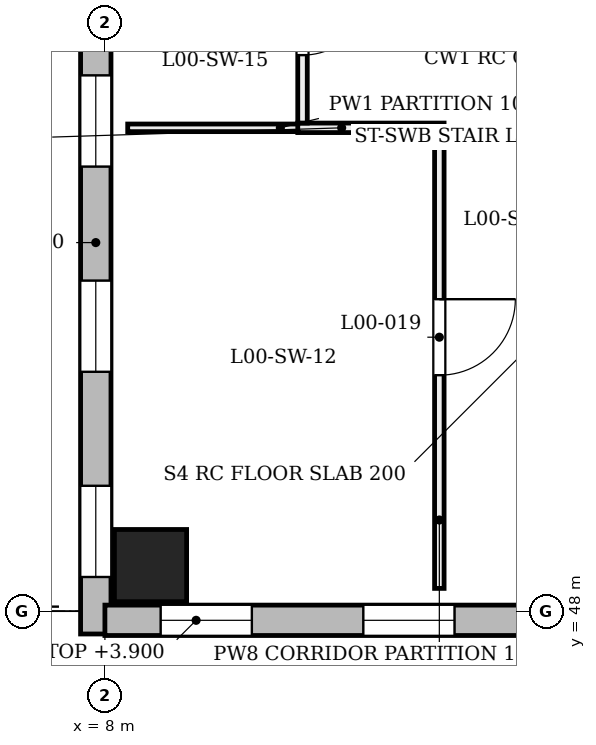
"""IFC4 building model, lengths in metres.
Left out: names, types, materials, properties, quantities, classifications, styles, units other than length and angle.
Written with IfcOpenShell. Run it as: python <this file> out.ifc"""

import sys

from ifc_helpers import new_model, si_unit, direction, frame, frame_2d, origin, origin_2d, place, context, subcontext, project, spatial, rectangle, extrude, element, fill, save


model = new_model("IFC4")
c1 = context("Model", 3, precision=1e-05, world=origin(), true_north=direction((0.0, 1.0)))
c2 = subcontext(c1, "Body", "Model", "MODEL_VIEW")
j1 = project(units=[si_unit("LENGTHUNIT", "METRE"), si_unit("PLANEANGLEUNIT", "RADIAN")], contexts=[c1])
p1 = place(None, origin())
s1 = spatial("IfcSite", under=j1, at=p1, CompositionType="ELEMENT")
p2 = place(p1, origin())
s2 = spatial("IfcBuilding", under=s1, at=p2, CompositionType="ELEMENT")
p3 = place(p2, origin())
s3 = spatial("IfcBuildingStorey", under=s2, at=p3, CompositionType="ELEMENT", Elevation=0.0)
p4 = place(p3, frame((8.6, 48.6, 0.0), z_axis=(0.0, 0.0, 1.0), x_axis=(1.0, 0.0, 0.0)))
e1 = element("IfcColumn", 1, at=p4, inside=s3, PredefinedType="COLUMN", context=c2, shape_type="SweptSolid", body=[
    extrude(rectangle(XDim=0.95, YDim=0.95, at=origin_2d()), origin(), (0.0, 0.0, 1.0), 4.8),
])
p5 = place(p3, frame((7.88, 47.7, 0.0), z_axis=(0.0, 0.0, 1.0), x_axis=(0.0, 1.0, 0.0)))
e2 = element("IfcWall", 2, at=p5, inside=s3, PredefinedType="SOLIDWALL", context=c2, shape_type="SweptSolid", body=[
    extrude(rectangle(XDim=16.575, YDim=0.4, at=frame_2d((8.288, 0.0))), origin(), (0.0, 0.0, 1.0), 3.9),
])
p6 = place(p5, frame((0.75, 0.0, 1.9)))
e3 = element("IfcOpeningElement", 3, at=p6, cuts=e2, PredefinedType="OPENING", context=c2, shape_type="SweptSolid", body=[
    extrude(rectangle(XDim=1.2, YDim=1.5, at=frame_2d((0.6, 0.75))), frame((0.0, 0.21, 0.0), z_axis=(0.0, -1.0, 0.0), x_axis=(1.0, 0.0, 0.0)), (0.0, 0.0, 1.0), 0.42),
])
p7 = place(p5, frame((3.45, 0.0, 1.9)))
e4 = element("IfcOpeningElement", 4, at=p7, cuts=e2, PredefinedType="OPENING", context=c2, shape_type="SweptSolid", body=[
    extrude(rectangle(XDim=1.2, YDim=1.5, at=frame_2d((0.6, 0.75))), frame((0.0, 0.21, 0.0), z_axis=(0.0, -1.0, 0.0), x_axis=(1.0, 0.0, 0.0)), (0.0, 0.0, 1.0), 0.42),
])
p8 = place(p5, frame((6.15, 0.0, 1.9)))
e5 = element("IfcOpeningElement", 5, at=p8, cuts=e2, PredefinedType="OPENING", context=c2, shape_type="SweptSolid", body=[
    extrude(rectangle(XDim=1.2, YDim=1.5, at=frame_2d((0.6, 0.75))), frame((0.0, 0.21, 0.0), z_axis=(0.0, -1.0, 0.0), x_axis=(1.0, 0.0, 0.0)), (0.0, 0.0, 1.0), 0.42),
])
p9 = place(p5, frame((8.85, 0.0, 1.9)))
e6 = element("IfcOpeningElement", 6, at=p9, cuts=e2, PredefinedType="OPENING", context=c2, shape_type="SweptSolid", body=[
    extrude(rectangle(XDim=1.2, YDim=1.5, at=frame_2d((0.6, 0.75))), frame((0.0, 0.21, 0.0), z_axis=(0.0, -1.0, 0.0), x_axis=(1.0, 0.0, 0.0)), (0.0, 0.0, 1.0), 0.42),
])
p10 = place(p5, frame((11.55, 0.0, 1.9)))
e7 = element("IfcOpeningElement", 7, at=p10, cuts=e2, PredefinedType="OPENING", context=c2, shape_type="SweptSolid", body=[
    extrude(rectangle(XDim=1.2, YDim=1.5, at=frame_2d((0.6, 0.75))), frame((0.0, 0.21, 0.0), z_axis=(0.0, -1.0, 0.0), x_axis=(1.0, 0.0, 0.0)), (0.0, 0.0, 1.0), 0.42),
])
p11 = place(p5, frame((14.25, 0.0, 1.9)))
e8 = element("IfcOpeningElement", 8, at=p11, cuts=e2, PredefinedType="OPENING", context=c2, shape_type="SweptSolid", body=[
    extrude(rectangle(XDim=1.2, YDim=1.5, at=frame_2d((0.6, 0.75))), frame((0.0, 0.21, 0.0), z_axis=(0.0, -1.0, 0.0), x_axis=(1.0, 0.0, 0.0)), (0.0, 0.0, 1.0), 0.42),
])
p12 = place(p3, frame((8.0, 47.88, 0.0), z_axis=(0.0, 0.0, 1.0), x_axis=(1.0, 0.0, 0.0)))
e9 = element("IfcWall", 9, at=p12, inside=s3, PredefinedType="SOLIDWALL", context=c2, shape_type="SweptSolid", body=[
    extrude(rectangle(XDim=8.0, YDim=0.4, at=frame_2d((4.0, 0.0))), origin(), (0.0, 0.0, 1.0), 3.9),
])
p13 = place(p12, frame((0.733, 0.0, 1.9)))
e10 = element("IfcOpeningElement", 10, at=p13, cuts=e9, PredefinedType="OPENING", context=c2, shape_type="SweptSolid", body=[
    extrude(rectangle(XDim=1.2, YDim=1.5, at=frame_2d((0.6, 0.75))), frame((0.0, 0.21, 0.0), z_axis=(0.0, -1.0, 0.0), x_axis=(1.0, 0.0, 0.0)), (0.0, 0.0, 1.0), 0.42),
])
p14 = place(p12, frame((3.4, 0.0, 1.9)))
e11 = element("IfcOpeningElement", 11, at=p14, cuts=e9, PredefinedType="OPENING", context=c2, shape_type="SweptSolid", body=[
    extrude(rectangle(XDim=1.2, YDim=1.5, at=frame_2d((0.6, 0.75))), frame((0.0, 0.21, 0.0), z_axis=(0.0, -1.0, 0.0), x_axis=(1.0, 0.0, 0.0)), (0.0, 0.0, 1.0), 0.42),
])
p15 = place(p12, frame((6.067, 0.0, 1.9)))
e12 = element("IfcOpeningElement", 12, at=p15, cuts=e9, PredefinedType="OPENING", context=c2, shape_type="SweptSolid", body=[
    extrude(rectangle(XDim=1.2, YDim=1.5, at=frame_2d((0.6, 0.75))), frame((0.0, 0.21, 0.0), z_axis=(0.0, -1.0, 0.0), x_axis=(1.0, 0.0, 0.0)), (0.0, 0.0, 1.0), 0.42),
])
p16 = place(p3, frame((12.4, 48.3, 0.0), z_axis=(0.0, 0.0, 1.0), x_axis=(0.0, 1.0, 0.0)))
e13 = element("IfcWall", 13, at=p16, inside=s3, PredefinedType="PARTITIONING", context=c2, shape_type="SweptSolid", body=[
    extrude(rectangle(XDim=5.998, YDim=0.125, at=frame_2d((2.999, 0.0))), origin(), (0.0, 0.0, 1.0), 3.98),
])
p17 = place(p16, frame((2.805, 0.0, 0.0)))
e14 = element("IfcOpeningElement", 14, at=p17, cuts=e13, PredefinedType="OPENING", context=c2, shape_type="SweptSolid", body=[
    extrude(rectangle(XDim=1.0, YDim=2.1, at=frame_2d((0.5, 1.05))), frame((0.0, 0.073, 0.0), z_axis=(0.0, -1.0, 0.0), x_axis=(1.0, 0.0, 0.0)), (0.0, 0.0, 1.0), 0.145),
])
p18 = place(p3, frame((8.3, 54.36, 0.0), z_axis=(0.0, 0.0, 1.0), x_axis=(1.0, 0.0, 0.0)))
e15 = element("IfcWall", 15, at=p18, inside=s3, PredefinedType="PARTITIONING", context=c2, shape_type="SweptSolid", body=[
    extrude(rectangle(XDim=2.363, YDim=0.1, at=frame_2d((1.181, 0.0))), origin(), (0.0, 0.0, 1.0), 3.98),
])
p19 = place(p3, frame((10.538, 54.36, 0.0), z_axis=(0.0, 0.0, 1.0), x_axis=(1.0, 0.0, 0.0)))
e16 = element("IfcWall", 16, at=p19, inside=s3, PredefinedType="PARTITIONING", context=c2, shape_type="SweptSolid", body=[
    extrude(rectangle(XDim=1.925, YDim=0.125, at=frame_2d((0.962, 0.0))), origin(), (0.0, 0.0, 1.0), 4.56),
])
p20 = place(p3, frame((10.6, 54.423, 0.0), z_axis=(0.0, 0.0, 1.0), x_axis=(0.0, 1.0, 0.0)))
e17 = element("IfcWall", 17, at=p20, inside=s3, PredefinedType="PARTITIONING", context=c2, shape_type="SweptSolid", body=[
    extrude(rectangle(XDim=4.723, YDim=0.125, at=frame_2d((2.362, 0.0))), origin(), (0.0, 0.0, 1.0), 3.98),
])
p21 = place(p20, frame((0.894, 0.0, 0.0)))
e18 = element("IfcOpeningElement", 18, at=p21, cuts=e17, PredefinedType="OPENING", context=c2, shape_type="SweptSolid", body=[
    extrude(rectangle(XDim=0.9, YDim=2.1, at=frame_2d((0.45, 1.05))), frame((0.0, 0.073, 0.0), z_axis=(0.0, -1.0, 0.0), x_axis=(1.0, 0.0, 0.0)), (0.0, 0.0, 1.0), 0.145),
])
p22 = place(p20, frame((3.318, 0.0, 0.0)))
e19 = element("IfcOpeningElement", 19, at=p22, cuts=e17, PredefinedType="OPENING", context=c2, shape_type="SweptSolid", body=[
    extrude(rectangle(XDim=0.9, YDim=2.1, at=frame_2d((0.45, 1.05))), frame((0.0, 0.073, 0.0), z_axis=(0.0, -1.0, 0.0), x_axis=(1.0, 0.0, 0.0)), (0.0, 0.0, 1.0), 0.145),
])
p23 = place(p6, origin())
e20 = element("IfcWindow", 20, at=p23, inside=s3, PartitioningType="SINGLE_PANEL", PredefinedType="WINDOW", context=c2, shape_type="SweptSolid", body=[
    extrude(rectangle(XDim=1.2, YDim=1.5, at=frame_2d((0.6, 0.75))), frame((0.0, 0.03, 0.0), z_axis=(0.0, -1.0, 0.0), x_axis=(1.0, 0.0, 0.0)), (0.0, 0.0, 1.0), 0.06),
])
fill(e3, e20)
p24 = place(p7, origin())
e21 = element("IfcWindow", 21, at=p24, inside=s3, PartitioningType="SINGLE_PANEL", PredefinedType="WINDOW", context=c2, shape_type="SweptSolid", body=[
    extrude(rectangle(XDim=1.2, YDim=1.5, at=frame_2d((0.6, 0.75))), frame((0.0, 0.03, 0.0), z_axis=(0.0, -1.0, 0.0), x_axis=(1.0, 0.0, 0.0)), (0.0, 0.0, 1.0), 0.06),
])
fill(e4, e21)
p25 = place(p8, origin())
e22 = element("IfcWindow", 22, at=p25, inside=s3, PartitioningType="SINGLE_PANEL", PredefinedType="WINDOW", context=c2, shape_type="SweptSolid", body=[
    extrude(rectangle(XDim=1.2, YDim=1.5, at=frame_2d((0.6, 0.75))), frame((0.0, 0.03, 0.0), z_axis=(0.0, -1.0, 0.0), x_axis=(1.0, 0.0, 0.0)), (0.0, 0.0, 1.0), 0.06),
])
fill(e5, e22)
p26 = place(p13, origin())
e23 = element("IfcWindow", 23, at=p26, inside=s3, PartitioningType="SINGLE_PANEL", PredefinedType="WINDOW", context=c2, shape_type="SweptSolid", body=[
    extrude(rectangle(XDim=1.2, YDim=1.5, at=frame_2d((0.6, 0.75))), frame((0.0, 0.03, 0.0), z_axis=(0.0, -1.0, 0.0), x_axis=(1.0, 0.0, 0.0)), (0.0, 0.0, 1.0), 0.06),
])
fill(e10, e23)
p27 = place(p14, origin())
e24 = element("IfcWindow", 24, at=p27, inside=s3, PartitioningType="SINGLE_PANEL", PredefinedType="WINDOW", context=c2, shape_type="SweptSolid", body=[
    extrude(rectangle(XDim=1.2, YDim=1.5, at=frame_2d((0.6, 0.75))), frame((0.0, 0.03, 0.0), z_axis=(0.0, -1.0, 0.0), x_axis=(1.0, 0.0, 0.0)), (0.0, 0.0, 1.0), 0.06),
])
fill(e11, e24)
p28 = place(p17, origin())
e25 = element("IfcDoor", 25, at=p28, inside=s3, OperationType="SINGLE_SWING_RIGHT", PredefinedType="DOOR", context=c2, shape_type="SweptSolid", body=[
    extrude(rectangle(XDim=1.0, YDim=2.1, at=frame_2d((0.5, 1.05))), frame((0.0, 0.025, 0.0), z_axis=(0.0, -1.0, 0.0), x_axis=(1.0, 0.0, 0.0)), (0.0, 0.0, 1.0), 0.05),
])
fill(e14, e25)
p29 = place(p21, origin())
e26 = element("IfcDoor", 26, at=p29, inside=s3, OperationType="SINGLE_SWING_RIGHT", PredefinedType="DOOR", context=c2, shape_type="SweptSolid", body=[
    extrude(rectangle(XDim=0.9, YDim=2.1, at=frame_2d((0.45, 1.05))), frame((0.0, 0.025, 0.0), z_axis=(0.0, -1.0, 0.0), x_axis=(1.0, 0.0, 0.0)), (0.0, 0.0, 1.0), 0.05),
])
fill(e18, e26)
save(model, sys.argv[1])
